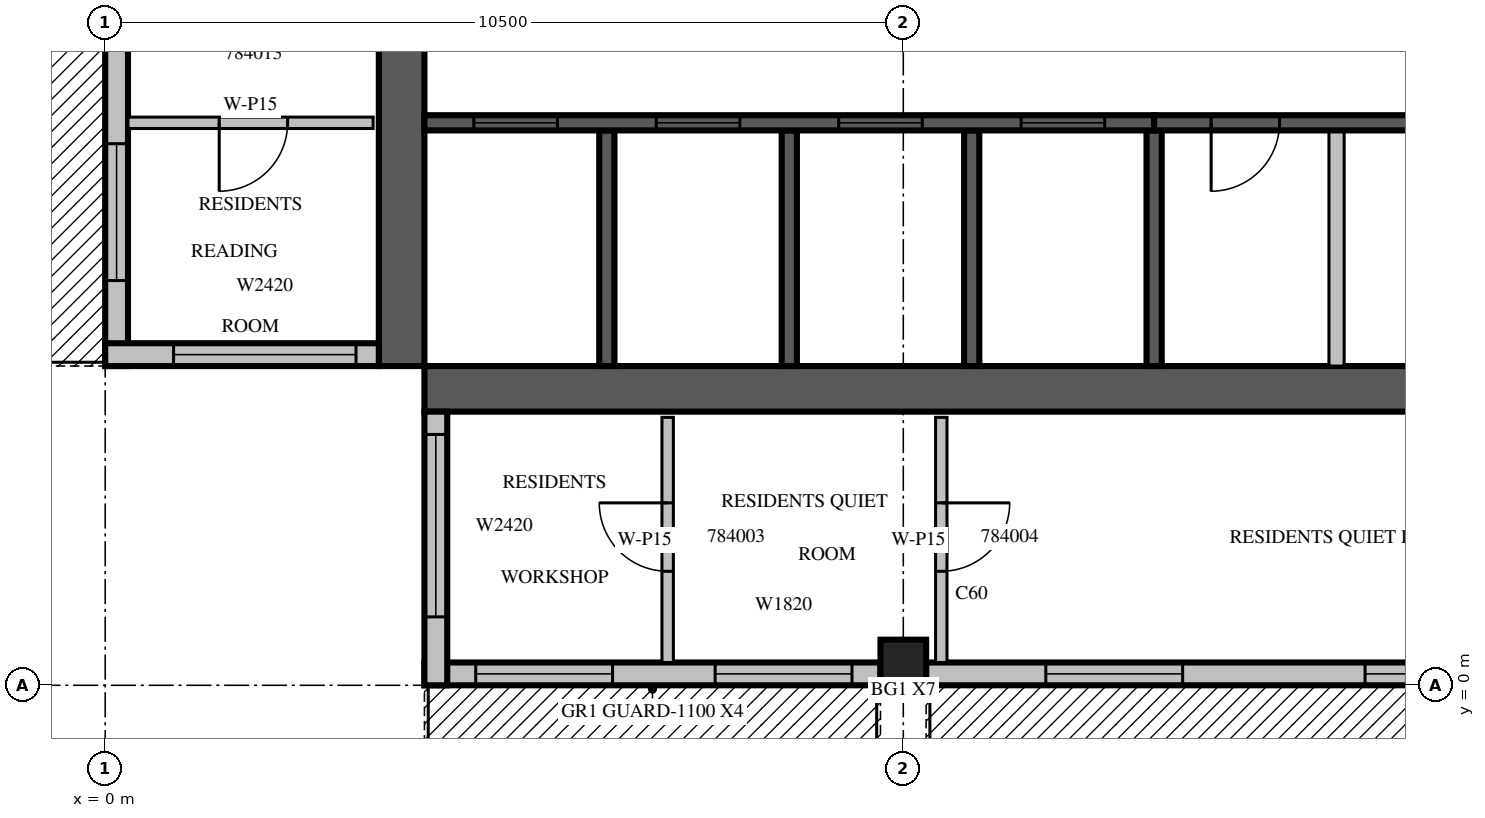
"""IFC4 building model, lengths in metres.
Left out: names, types, materials, properties, quantities, classifications, styles, units other than length and angle.
Written with IfcOpenShell. Run it as: python <this file> out.ifc"""

import sys

from ifc_helpers import new_model, si_unit, direction, frame, frame_2d, origin, origin_2d, place, context, subcontext, project, spatial, rectangle, extrude, source, transform, mapped, element, fill, save


model = new_model("IFC4")
c1 = context("Model", 3, precision=1e-05, world=origin(), true_north=direction((0.0, 1.0)))
c2 = subcontext(c1, "Body", "Model", "MODEL_VIEW")
j1 = project(units=[si_unit("LENGTHUNIT", "METRE"), si_unit("PLANEANGLEUNIT", "RADIAN")], contexts=[c1])
p1 = place(None, origin())
s1 = spatial("IfcSite", under=j1, at=p1, CompositionType="ELEMENT")
p2 = place(p1, origin())
s2 = spatial("IfcBuilding", under=s1, at=p2, CompositionType="ELEMENT")
p3 = place(p2, frame((0.0, 0.0, 354.5)))
s3 = spatial("IfcBuildingStorey", under=s2, at=p3, CompositionType="ELEMENT", Elevation=354.5)
m1 = source(origin(), c2, "Body", "SweptSolid", [
    extrude(rectangle(XDim=0.6, YDim=0.6, at=origin_2d()), origin(), (0.0, 0.0, 1.0), 3.5),
])
p4 = place(p3, frame((10.5, 0.3, 0.0), z_axis=(0.0, 0.0, 1.0), x_axis=(1.0, 0.0, 0.0)))
e1 = element("IfcColumn", 1, at=p4, inside=s3, PredefinedType="COLUMN", context=c2, shape_type="MappedRepresentation", body=[
    mapped(m1, transform((0.0, 0.0, 0.0), scale=1.0)),
])
m2 = source(origin(), c2, "Body", "SweptSolid", [
    extrude(rectangle(XDim=17.4, YDim=0.6, at=frame_2d((8.7, 0.0))), origin(), (0.0, 0.0, 1.0), 3.5),
])
p5 = place(p3, frame((3.9, 4.2, 0.0), z_axis=(0.0, 0.0, 1.0), x_axis=(0.0, 1.0, 0.0)))
e2 = element("IfcWall", 2, at=p5, inside=s3, PredefinedType="SHEAR", context=c2, shape_type="MappedRepresentation", body=[
    mapped(m2, transform((0.0, 0.0, 0.0), scale=1.0)),
])
m3 = source(origin(), c2, "Body", "SweptSolid", [
    extrude(rectangle(XDim=2.2, YDim=2.1, at=frame_2d((1.1, 1.05))), frame((0.0, 0.31, 0.0), z_axis=(0.0, -1.0, 0.0), x_axis=(1.0, 0.0, 0.0)), (0.0, 0.0, 1.0), 0.62),
])
p6 = place(p5, frame((4.2, 0.0, 0.0)))
e3 = element("IfcOpeningElement", 3, at=p6, cuts=e2, PredefinedType="OPENING", context=c2, shape_type="MappedRepresentation", body=[
    mapped(m3, transform((0.0, 0.0, 0.0), scale=1.0)),
])
p7 = place(p3, frame((4.2, 3.9, 0.0), z_axis=(0.0, 0.0, 1.0), x_axis=(1.0, 0.0, 0.0)))
e4 = element("IfcWall", 4, at=p7, inside=s3, PredefinedType="SHEAR", context=c2, shape_type="MappedRepresentation", body=[
    mapped(m2, transform((0.0, 0.0, 0.0), scale=1.0)),
])
m4 = source(origin(), c2, "Body", "SweptSolid", [
    extrude(rectangle(XDim=0.9, YDim=2.1, at=frame_2d((0.45, 1.05))), frame((0.0, 0.31, 0.0), z_axis=(0.0, -1.0, 0.0), x_axis=(1.0, 0.0, 0.0)), (0.0, 0.0, 1.0), 0.62),
])
p8 = place(p7, frame((14.0, 0.0, 0.0)))
e5 = element("IfcOpeningElement", 5, at=p8, cuts=e4, PredefinedType="OPENING", context=c2, shape_type="MappedRepresentation", body=[
    mapped(m4, transform((0.0, 0.0, 0.0), scale=1.0)),
])
m5 = source(origin(), c2, "Body", "SweptSolid", [
    extrude(rectangle(XDim=6.0, YDim=0.3, at=frame_2d((3.0, 0.0))), origin(), (0.0, 0.0, 1.0), 3.1),
])
p9 = place(p3, frame((4.2, 0.15, 0.0), z_axis=(0.0, 0.0, 1.0), x_axis=(1.0, 0.0, 0.0)))
e6 = element("IfcWall", 6, at=p9, inside=s3, PredefinedType="STANDARD", context=c2, shape_type="MappedRepresentation", body=[
    mapped(m5, transform((0.0, 0.0, 0.0), scale=1.0)),
])
m6 = source(origin(), c2, "Body", "SweptSolid", [
    extrude(rectangle(XDim=1.8, YDim=2.4, at=frame_2d((0.9, 1.2))), frame((0.0, 0.16, 0.0), z_axis=(0.0, -1.0, 0.0), x_axis=(1.0, 0.0, 0.0)), (0.0, 0.0, 1.0), 0.32),
])
p10 = place(p9, frame((0.675, 0.0, 0.0)))
e7 = element("IfcOpeningElement", 7, at=p10, cuts=e6, PredefinedType="OPENING", context=c2, shape_type="MappedRepresentation", body=[
    mapped(m6, transform((0.0, 0.0, 0.0), scale=1.0)),
])
m7 = source(origin(), c2, "Body", "SweptSolid", [
    extrude(rectangle(XDim=1.8, YDim=2.0, at=frame_2d((0.9, 1.0))), frame((0.0, 0.16, 0.0), z_axis=(0.0, -1.0, 0.0), x_axis=(1.0, 0.0, 0.0)), (0.0, 0.0, 1.0), 0.32),
])
p11 = place(p9, frame((3.825, 0.0, 0.6)))
e8 = element("IfcOpeningElement", 8, at=p11, cuts=e6, PredefinedType="OPENING", context=c2, shape_type="MappedRepresentation", body=[
    mapped(m7, transform((0.0, 0.0, 0.0), scale=1.0)),
])
m8 = source(origin(), c2, "Body", "SweptSolid", [
    extrude(rectangle(XDim=9.9, YDim=0.3, at=frame_2d((4.95, 0.0))), origin(), (0.0, 0.0, 1.0), 3.1),
])
p12 = place(p3, frame((10.8, 0.15, 0.0), z_axis=(0.0, 0.0, 1.0), x_axis=(1.0, 0.0, 0.0)))
e9 = element("IfcWall", 9, at=p12, inside=s3, PredefinedType="STANDARD", context=c2, shape_type="MappedRepresentation", body=[
    mapped(m8, transform((0.0, 0.0, 0.0), scale=1.0)),
])
p13 = place(p12, frame((1.575, 0.0, 0.0)))
e10 = element("IfcOpeningElement", 10, at=p13, cuts=e9, PredefinedType="OPENING", context=c2, shape_type="MappedRepresentation", body=[
    mapped(m6, transform((0.0, 0.0, 0.0), scale=1.0)),
])
m9 = source(origin(), c2, "Body", "SweptSolid", [
    extrude(rectangle(XDim=3.6, YDim=2.0, at=frame_2d((1.8, 1.0))), frame((0.0, 0.16, 0.0), z_axis=(0.0, -1.0, 0.0), x_axis=(1.0, 0.0, 0.0)), (0.0, 0.0, 1.0), 0.32),
])
p14 = place(p12, frame((5.775, 0.0, 0.6)))
e11 = element("IfcOpeningElement", 11, at=p14, cuts=e9, PredefinedType="OPENING", context=c2, shape_type="MappedRepresentation", body=[
    mapped(m9, transform((0.0, 0.0, 0.0), scale=1.0)),
])
m10 = source(origin(), c2, "Body", "SweptSolid", [
    extrude(rectangle(XDim=5.25, YDim=0.3, at=frame_2d((2.625, 0.0))), origin(), (0.0, 0.0, 1.0), 3.1),
])
p15 = place(p3, frame((0.15, 9.45, 0.0), z_axis=(0.0, 0.0, 1.0), x_axis=(0.0, -1.0, 0.0)))
e12 = element("IfcWall", 12, at=p15, inside=s3, PredefinedType="STANDARD", context=c2, shape_type="MappedRepresentation", body=[
    mapped(m10, transform((0.0, 0.0, 0.0), scale=1.0)),
])
p16 = place(p15, frame((2.325, 0.0, 0.0)))
e13 = element("IfcOpeningElement", 13, at=p16, cuts=e12, PredefinedType="OPENING", context=c2, shape_type="MappedRepresentation", body=[
    mapped(m6, transform((0.0, 0.0, 0.0), scale=1.0)),
])
m11 = source(origin(), c2, "Body", "SweptSolid", [
    extrude(rectangle(XDim=3.6, YDim=0.3, at=frame_2d((1.8, 0.0))), origin(), (0.0, 0.0, 1.0), 3.1),
])
p17 = place(p3, frame((0.0, 4.35, 0.0), z_axis=(0.0, 0.0, 1.0), x_axis=(1.0, 0.0, 0.0)))
e14 = element("IfcWall", 14, at=p17, inside=s3, PredefinedType="STANDARD", context=c2, shape_type="MappedRepresentation", body=[
    mapped(m11, transform((0.0, 0.0, 0.0), scale=1.0)),
])
m12 = source(origin(), c2, "Body", "SweptSolid", [
    extrude(rectangle(XDim=2.4, YDim=2.0, at=frame_2d((1.2, 1.0))), frame((0.0, 0.16, 0.0), z_axis=(0.0, -1.0, 0.0), x_axis=(1.0, 0.0, 0.0)), (0.0, 0.0, 1.0), 0.32),
])
p18 = place(p17, frame((0.9, 0.0, 0.6)))
e15 = element("IfcOpeningElement", 15, at=p18, cuts=e14, PredefinedType="OPENING", context=c2, shape_type="MappedRepresentation", body=[
    mapped(m12, transform((0.0, 0.0, 0.0), scale=1.0)),
])
p19 = place(p3, frame((4.35, 3.6, 0.0), z_axis=(0.0, 0.0, 1.0), x_axis=(0.0, -1.0, 0.0)))
e16 = element("IfcWall", 16, at=p19, inside=s3, PredefinedType="STANDARD", context=c2, shape_type="MappedRepresentation", body=[
    mapped(m11, transform((0.0, 0.0, 0.0), scale=1.0)),
])
p20 = place(p19, frame((0.3, 0.0, 0.6)))
e17 = element("IfcOpeningElement", 17, at=p20, cuts=e16, PredefinedType="OPENING", context=c2, shape_type="MappedRepresentation", body=[
    mapped(m12, transform((0.0, 0.0, 0.0), scale=1.0)),
])
m13 = source(origin(), c2, "Body", "SweptSolid", [
    extrude(rectangle(XDim=3.1, YDim=0.2, at=frame_2d((1.55, 0.0))), origin(), (0.0, 0.0, 1.0), 3.5),
])
for number, where, z_axis, x_axis in (
    (18, (6.6, 4.2, 0.0), (0.0, 0.0, 1.0), (0.0, 1.0, 0.0)),
    (19, (9.0, 4.2, 0.0), (0.0, 0.0, 1.0), (0.0, 1.0, 0.0)),
    (20, (11.4, 4.2, 0.0), (0.0, 0.0, 1.0), (0.0, 1.0, 0.0)),
):
    element("IfcWall", number, at=place(p3, frame(where, z_axis=z_axis, x_axis=x_axis)), inside=s3, PredefinedType="SOLIDWALL", context=c2, shape_type="MappedRepresentation", body=[
        mapped(m13, transform((0.0, 0.0, 0.0), scale=1.0)),
    ])
m14 = source(origin(), c2, "Body", "SweptSolid", [
    extrude(rectangle(XDim=3.1, YDim=0.2, at=frame_2d((1.55, 0.0))), origin(), (0.0, 0.0, 1.0), 3.1),
])
p21 = place(p3, frame((13.8, 4.2, 0.0), z_axis=(0.0, 0.0, 1.0), x_axis=(0.0, 1.0, 0.0)))
e21 = element("IfcWall", 21, at=p21, inside=s3, PredefinedType="SOLIDWALL", context=c2, shape_type="MappedRepresentation", body=[
    mapped(m14, transform((0.0, 0.0, 0.0), scale=1.0)),
])
m15 = source(origin(), c2, "Body", "SweptSolid", [
    extrude(rectangle(XDim=3.1, YDim=0.2, at=frame_2d((1.55, 0.0))), origin(), (0.0, 0.0, 1.0), 3.1),
])
p22 = place(p3, frame((16.2, 4.2, 0.0), z_axis=(0.0, 0.0, 1.0), x_axis=(0.0, 1.0, 0.0)))
e22 = element("IfcWall", 22, at=p22, inside=s3, PredefinedType="PARTITIONING", context=c2, shape_type="MappedRepresentation", body=[
    mapped(m15, transform((0.0, 0.0, 0.0), scale=1.0)),
])
m16 = source(origin(), c2, "Body", "SweptSolid", [
    extrude(rectangle(XDim=9.6, YDim=0.2, at=frame_2d((4.8, 0.0))), origin(), (0.0, 0.0, 1.0), 3.5),
])
p23 = place(p3, frame((4.2, 7.4, 0.0), z_axis=(0.0, 0.0, 1.0), x_axis=(1.0, 0.0, 0.0)))
e23 = element("IfcWall", 23, at=p23, inside=s3, PredefinedType="SOLIDWALL", context=c2, shape_type="MappedRepresentation", body=[
    mapped(m16, transform((0.0, 0.0, 0.0), scale=1.0)),
])
m17 = source(origin(), c2, "Body", "SweptSolid", [
    extrude(rectangle(XDim=1.1, YDim=2.1, at=frame_2d((0.55, 1.05))), frame((0.0, 0.11, 0.0), z_axis=(0.0, -1.0, 0.0), x_axis=(1.0, 0.0, 0.0)), (0.0, 0.0, 1.0), 0.22),
])
p24 = place(p23, frame((0.65, 0.0, 0.0)))
e24 = element("IfcOpeningElement", 24, at=p24, cuts=e23, PredefinedType="OPENING", context=c2, shape_type="MappedRepresentation", body=[
    mapped(m17, transform((0.0, 0.0, 0.0), scale=1.0)),
])
p25 = place(p23, frame((3.05, 0.0, 0.0)))
e25 = element("IfcOpeningElement", 25, at=p25, cuts=e23, PredefinedType="OPENING", context=c2, shape_type="MappedRepresentation", body=[
    mapped(m17, transform((0.0, 0.0, 0.0), scale=1.0)),
])
p26 = place(p23, frame((5.45, 0.0, 0.0)))
e26 = element("IfcOpeningElement", 26, at=p26, cuts=e23, PredefinedType="OPENING", context=c2, shape_type="MappedRepresentation", body=[
    mapped(m17, transform((0.0, 0.0, 0.0), scale=1.0)),
])
p27 = place(p23, frame((7.85, 0.0, 0.0)))
e27 = element("IfcOpeningElement", 27, at=p27, cuts=e23, PredefinedType="OPENING", context=c2, shape_type="MappedRepresentation", body=[
    mapped(m17, transform((0.0, 0.0, 0.0), scale=1.0)),
])
m18 = source(origin(), c2, "Body", "SweptSolid", [
    extrude(rectangle(XDim=7.2, YDim=0.2, at=frame_2d((3.6, 0.0))), origin(), (0.0, 0.0, 1.0), 3.1),
])
p28 = place(p3, frame((13.8, 7.4, 0.0), z_axis=(0.0, 0.0, 1.0), x_axis=(1.0, 0.0, 0.0)))
e28 = element("IfcWall", 28, at=p28, inside=s3, PredefinedType="SOLIDWALL", context=c2, shape_type="MappedRepresentation", body=[
    mapped(m18, transform((0.0, 0.0, 0.0), scale=1.0)),
])
m19 = source(origin(), c2, "Body", "SweptSolid", [
    extrude(rectangle(XDim=0.9, YDim=2.1, at=frame_2d((0.45, 1.05))), frame((0.0, 0.11, 0.0), z_axis=(0.0, -1.0, 0.0), x_axis=(1.0, 0.0, 0.0)), (0.0, 0.0, 1.0), 0.22),
])
p29 = place(p28, frame((0.75, 0.0, 0.0)))
e29 = element("IfcOpeningElement", 29, at=p29, cuts=e28, PredefinedType="OPENING", context=c2, shape_type="MappedRepresentation", body=[
    mapped(m19, transform((0.0, 0.0, 0.0), scale=1.0)),
])
p30 = place(p28, frame((4.35, 0.0, 0.0)))
e30 = element("IfcOpeningElement", 30, at=p30, cuts=e28, PredefinedType="OPENING", context=c2, shape_type="MappedRepresentation", body=[
    mapped(m19, transform((0.0, 0.0, 0.0), scale=1.0)),
])
m20 = source(origin(), c2, "Body", "SweptSolid", [
    extrude(rectangle(XDim=3.225, YDim=0.15, at=frame_2d((1.613, 0.0))), origin(), (0.0, 0.0, 1.0), 3.1),
])
p31 = place(p3, frame((7.4, 3.525, 0.0), z_axis=(0.0, 0.0, 1.0), x_axis=(0.0, -1.0, 0.0)))
e31 = element("IfcWall", 31, at=p31, inside=s3, PredefinedType="PARTITIONING", context=c2, shape_type="MappedRepresentation", body=[
    mapped(m20, transform((0.0, 0.0, 0.0), scale=1.0)),
])
m21 = source(origin(), c2, "Body", "SweptSolid", [
    extrude(rectangle(XDim=0.9, YDim=2.1, at=frame_2d((0.45, 1.05))), frame((0.0, 0.085, 0.0), z_axis=(0.0, -1.0, 0.0), x_axis=(1.0, 0.0, 0.0)), (0.0, 0.0, 1.0), 0.17),
])
p32 = place(p31, frame((1.125, 0.0, 0.0)))
e32 = element("IfcOpeningElement", 32, at=p32, cuts=e31, PredefinedType="OPENING", context=c2, shape_type="MappedRepresentation", body=[
    mapped(m21, transform((0.0, 0.0, 0.0), scale=1.0)),
])
p33 = place(p3, frame((11.0, 3.525, 0.0), z_axis=(0.0, 0.0, 1.0), x_axis=(0.0, -1.0, 0.0)))
e33 = element("IfcWall", 33, at=p33, inside=s3, PredefinedType="PARTITIONING", context=c2, shape_type="MappedRepresentation", body=[
    mapped(m20, transform((0.0, 0.0, 0.0), scale=1.0)),
])
p34 = place(p33, frame((1.125, 0.0, 0.0)))
e34 = element("IfcOpeningElement", 34, at=p34, cuts=e33, PredefinedType="OPENING", context=c2, shape_type="MappedRepresentation", body=[
    mapped(m21, transform((0.0, 0.0, 0.0), scale=1.0)),
])
p35 = place(p3, frame((0.3, 7.4, 0.0), z_axis=(0.0, 0.0, 1.0), x_axis=(1.0, 0.0, 0.0)))
e35 = element("IfcWall", 35, at=p35, inside=s3, PredefinedType="PARTITIONING", context=c2, shape_type="MappedRepresentation", body=[
    mapped(m20, transform((0.0, 0.0, 0.0), scale=1.0)),
])
p36 = place(p35, frame((1.2, 0.0, 0.0)))
e36 = element("IfcOpeningElement", 36, at=p36, cuts=e35, PredefinedType="OPENING", context=c2, shape_type="MappedRepresentation", body=[
    mapped(m21, transform((0.0, 0.0, 0.0), scale=1.0)),
])
m22 = source(origin(), c2, "Body", "SweptSolid", [
    extrude(rectangle(XDim=1.8, YDim=2.4, at=frame_2d((0.9, 1.2))), frame((0.0, 0.025, 0.0), z_axis=(0.0, -1.0, 0.0), x_axis=(1.0, 0.0, 0.0)), (0.0, 0.0, 1.0), 0.05),
])
p37 = place(p10, origin())
e37 = element("IfcDoor", 37, at=p37, inside=s3, OperationType="SLIDING_TO_LEFT", PredefinedType="DOOR", context=c2, shape_type="MappedRepresentation", body=[
    mapped(m22, transform((0.0, 0.0, 0.0), scale=1.0)),
])
fill(e7, e37)
m23 = source(origin(), c2, "Body", "SweptSolid", [
    extrude(rectangle(XDim=1.8, YDim=2.0, at=frame_2d((0.9, 1.0))), frame((0.0, 0.03, 0.0), z_axis=(0.0, -1.0, 0.0), x_axis=(1.0, 0.0, 0.0)), (0.0, 0.0, 1.0), 0.06),
])
p38 = place(p11, origin())
e38 = element("IfcWindow", 38, at=p38, inside=s3, PartitioningType="SINGLE_PANEL", PredefinedType="WINDOW", context=c2, shape_type="MappedRepresentation", body=[
    mapped(m23, transform((0.0, 0.0, 0.0), scale=1.0)),
])
fill(e8, e38)
p39 = place(p13, origin())
e39 = element("IfcDoor", 39, at=p39, inside=s3, OperationType="SLIDING_TO_LEFT", PredefinedType="DOOR", context=c2, shape_type="MappedRepresentation", body=[
    mapped(m22, transform((0.0, 0.0, 0.0), scale=1.0)),
])
fill(e10, e39)
m24 = source(origin(), c2, "Body", "SweptSolid", [
    extrude(rectangle(XDim=3.6, YDim=2.0, at=frame_2d((1.8, 1.0))), frame((0.0, 0.03, 0.0), z_axis=(0.0, -1.0, 0.0), x_axis=(1.0, 0.0, 0.0)), (0.0, 0.0, 1.0), 0.06),
])
p40 = place(p14, origin())
e40 = element("IfcWindow", 40, at=p40, inside=s3, PartitioningType="SINGLE_PANEL", PredefinedType="WINDOW", context=c2, shape_type="MappedRepresentation", body=[
    mapped(m24, transform((0.0, 0.0, 0.0), scale=1.0)),
])
fill(e11, e40)
p41 = place(p16, origin())
e41 = element("IfcDoor", 41, at=p41, inside=s3, OperationType="SLIDING_TO_LEFT", PredefinedType="DOOR", context=c2, shape_type="MappedRepresentation", body=[
    mapped(m22, transform((0.0, 0.0, 0.0), scale=1.0)),
])
fill(e13, e41)
m25 = source(origin(), c2, "Body", "SweptSolid", [
    extrude(rectangle(XDim=2.4, YDim=2.0, at=frame_2d((1.2, 1.0))), frame((0.0, 0.03, 0.0), z_axis=(0.0, -1.0, 0.0), x_axis=(1.0, 0.0, 0.0)), (0.0, 0.0, 1.0), 0.06),
])
p42 = place(p18, origin())
e42 = element("IfcWindow", 42, at=p42, inside=s3, PartitioningType="SINGLE_PANEL", PredefinedType="WINDOW", context=c2, shape_type="MappedRepresentation", body=[
    mapped(m25, transform((0.0, 0.0, 0.0), scale=1.0)),
])
fill(e15, e42)
p43 = place(p20, origin())
e43 = element("IfcWindow", 43, at=p43, inside=s3, PartitioningType="SINGLE_PANEL", PredefinedType="WINDOW", context=c2, shape_type="MappedRepresentation", body=[
    mapped(m25, transform((0.0, 0.0, 0.0), scale=1.0)),
])
fill(e17, e43)
m26 = source(origin(), c2, "Body", "SweptSolid", [
    extrude(rectangle(XDim=1.1, YDim=2.1, at=frame_2d((0.55, 1.05))), frame((0.0, 0.025, 0.0), z_axis=(0.0, -1.0, 0.0), x_axis=(1.0, 0.0, 0.0)), (0.0, 0.0, 1.0), 0.05),
])
p44 = place(p24, origin())
e44 = element("IfcDoor", 44, at=p44, inside=s3, OperationType="SLIDING_TO_LEFT", PredefinedType="DOOR", context=c2, shape_type="MappedRepresentation", body=[
    mapped(m26, transform((0.0, 0.0, 0.0), scale=1.0)),
])
fill(e24, e44)
p45 = place(p25, origin())
e45 = element("IfcDoor", 45, at=p45, inside=s3, OperationType="SLIDING_TO_LEFT", PredefinedType="DOOR", context=c2, shape_type="MappedRepresentation", body=[
    mapped(m26, transform((0.0, 0.0, 0.0), scale=1.0)),
])
fill(e25, e45)
p46 = place(p26, origin())
e46 = element("IfcDoor", 46, at=p46, inside=s3, OperationType="SLIDING_TO_LEFT", PredefinedType="DOOR", context=c2, shape_type="MappedRepresentation", body=[
    mapped(m26, transform((0.0, 0.0, 0.0), scale=1.0)),
])
fill(e26, e46)
p47 = place(p27, origin())
e47 = element("IfcDoor", 47, at=p47, inside=s3, OperationType="SLIDING_TO_LEFT", PredefinedType="DOOR", context=c2, shape_type="MappedRepresentation", body=[
    mapped(m26, transform((0.0, 0.0, 0.0), scale=1.0)),
])
fill(e27, e47)
m27 = source(origin(), c2, "Body", "SweptSolid", [
    extrude(rectangle(XDim=0.9, YDim=2.1, at=frame_2d((0.45, 1.05))), frame((0.0, 0.025, 0.0), z_axis=(0.0, -1.0, 0.0), x_axis=(1.0, 0.0, 0.0)), (0.0, 0.0, 1.0), 0.05),
])
p48 = place(p29, origin())
e48 = element("IfcDoor", 48, at=p48, inside=s3, OperationType="SINGLE_SWING_RIGHT", PredefinedType="DOOR", context=c2, shape_type="MappedRepresentation", body=[
    mapped(m27, transform((0.0, 0.0, 0.0), scale=1.0)),
])
fill(e29, e48)
p49 = place(p32, origin())
e49 = element("IfcDoor", 49, at=p49, inside=s3, OperationType="SINGLE_SWING_RIGHT", PredefinedType="DOOR", context=c2, shape_type="MappedRepresentation", body=[
    mapped(m27, transform((0.0, 0.0, 0.0), scale=1.0)),
])
fill(e32, e49)
p50 = place(p34, origin())
e50 = element("IfcDoor", 50, at=p50, inside=s3, OperationType="SINGLE_SWING_LEFT", PredefinedType="DOOR", context=c2, shape_type="MappedRepresentation", body=[
    mapped(m27, transform((0.0, 0.0, 0.0), scale=1.0)),
])
fill(e34, e50)
p51 = place(p36, origin())
e51 = element("IfcDoor", 51, at=p51, inside=s3, OperationType="SINGLE_SWING_RIGHT", PredefinedType="DOOR", context=c2, shape_type="MappedRepresentation", body=[
    mapped(m27, transform((0.0, 0.0, 0.0), scale=1.0)),
])
fill(e36, e51)
save(model, sys.argv[1])
